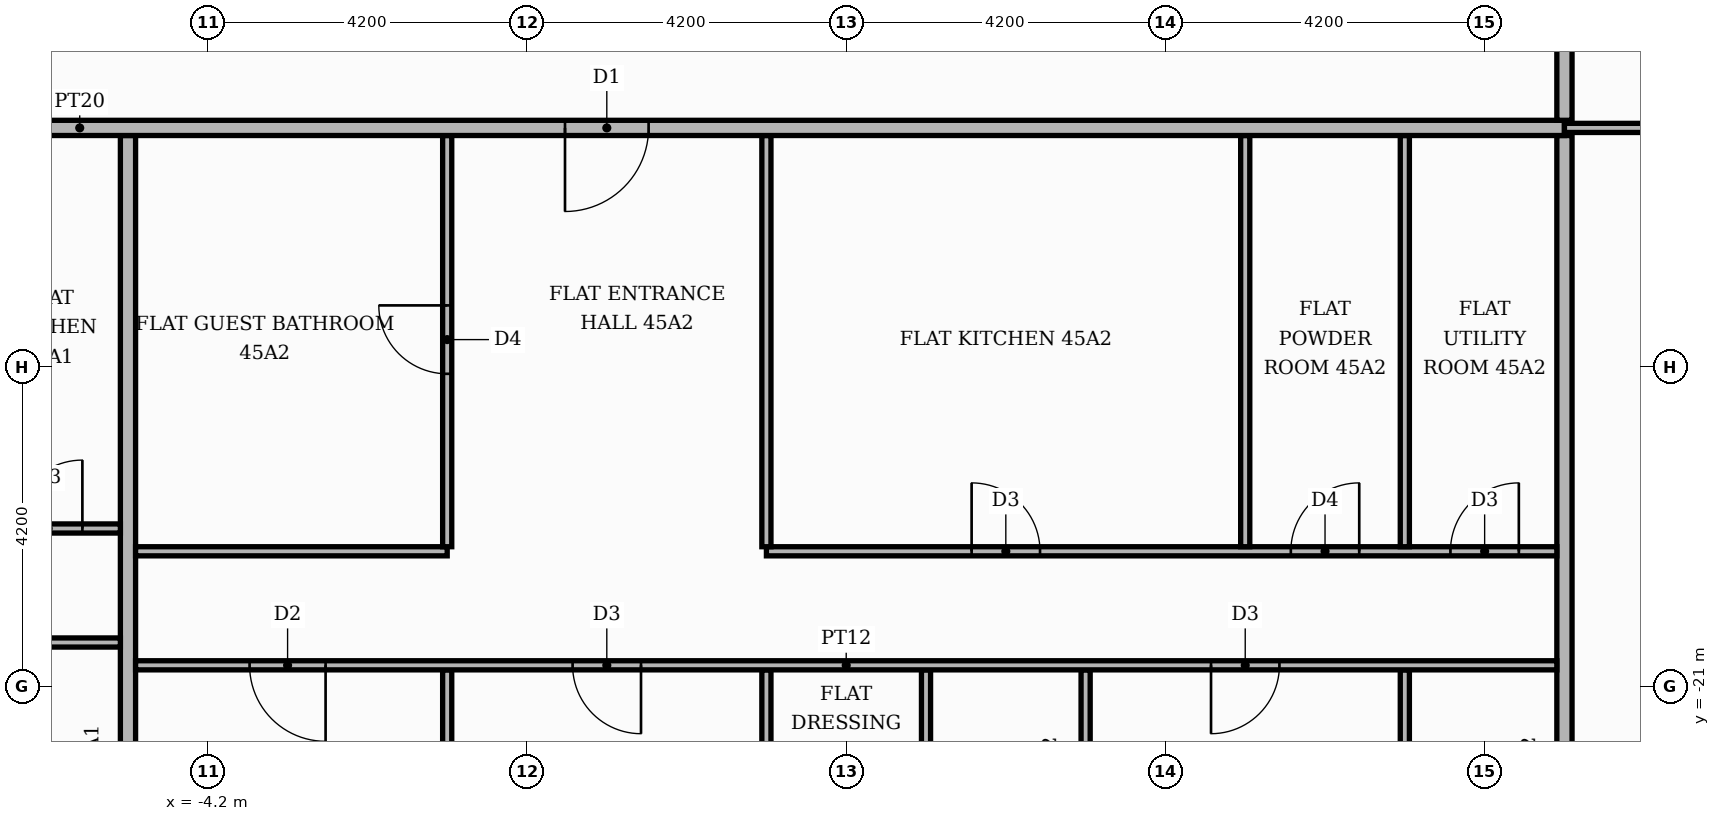
"""IFC4 building model, lengths in metres.
Left out: names, types, materials, properties, quantities, classifications, styles, units other than length and angle.
Written with IfcOpenShell. Run it as: python <this file> out.ifc"""

import sys

from ifc_helpers import new_model, si_unit, direction, frame, frame_2d, origin, place, context, subcontext, project, spatial, rectangle, extrude, element, fill, save


model = new_model("IFC4")
c1 = context("Model", 3, precision=1e-05, world=origin(), true_north=direction((0.0, 1.0)))
c2 = subcontext(c1, "Body", "Model", "MODEL_VIEW")
j1 = project(units=[si_unit("LENGTHUNIT", "METRE"), si_unit("PLANEANGLEUNIT", "RADIAN")], contexts=[c1])
p1 = place(None, origin())
s1 = spatial("IfcSite", under=j1, at=p1, CompositionType="ELEMENT")
p2 = place(p1, origin())
s2 = spatial("IfcBuilding", under=s1, at=p2, CompositionType="ELEMENT")
p3 = place(p2, frame((0.0, 0.0, 192.3)))
s3 = spatial("IfcBuildingStorey", under=s2, at=p3, CompositionType="ELEMENT", Elevation=192.3)
p4 = place(p3, frame((-5.25, -25.42, 0.0), z_axis=(0.0, 0.0, 1.0), x_axis=(0.0, 1.0, 0.0)))
e1 = element("IfcWall", 1, at=p4, inside=s3, PredefinedType="PARTITIONING", context=c2, shape_type="SweptSolid", body=[
    extrude(rectangle(XDim=11.67, YDim=0.2, at=frame_2d((5.835, 0.0))), origin(), (0.0, 0.0, 1.0), 3.48),
])
p5 = place(p3, frame((-1.05, -25.42, 0.0), z_axis=(0.0, 0.0, 1.0), x_axis=(0.0, 1.0, 0.0)))
e2 = element("IfcWall", 2, at=p5, inside=s3, PredefinedType="PARTITIONING", context=c2, shape_type="SweptSolid", body=[
    extrude(rectangle(XDim=4.64, YDim=0.12, at=frame_2d((2.32, 0.0))), origin(), (0.0, 0.0, 1.0), 3.48),
])
p6 = place(p3, frame((3.15, -25.42, 0.0), z_axis=(0.0, 0.0, 1.0), x_axis=(0.0, 1.0, 0.0)))
e3 = element("IfcWall", 3, at=p6, inside=s3, PredefinedType="PARTITIONING", context=c2, shape_type="SweptSolid", body=[
    extrude(rectangle(XDim=4.64, YDim=0.12, at=frame_2d((2.32, 0.0))), origin(), (0.0, 0.0, 1.0), 3.48),
])
p7 = place(p6, frame((1.75, 0.0, 0.0)))
e4 = element("IfcOpeningElement", 4, at=p7, cuts=e3, PredefinedType="OPENING", context=c2, shape_type="SweptSolid", body=[
    extrude(rectangle(XDim=0.9, YDim=2.1, at=frame_2d((0.45, 1.05))), frame((0.0, 0.07, 0.0), z_axis=(0.0, -1.0, 0.0), x_axis=(1.0, 0.0, 0.0)), (0.0, 0.0, 1.0), 0.14),
])
p8 = place(p3, frame((5.25, -25.42, 0.0), z_axis=(0.0, 0.0, 1.0), x_axis=(0.0, 1.0, 0.0)))
e5 = element("IfcWall", 5, at=p8, inside=s3, PredefinedType="PARTITIONING", context=c2, shape_type="SweptSolid", body=[
    extrude(rectangle(XDim=4.64, YDim=0.12, at=frame_2d((2.32, 0.0))), origin(), (0.0, 0.0, 1.0), 3.48),
])
p9 = place(p8, frame((1.75, 0.0, 0.0)))
e6 = element("IfcOpeningElement", 6, at=p9, cuts=e5, PredefinedType="OPENING", context=c2, shape_type="SweptSolid", body=[
    extrude(rectangle(XDim=0.9, YDim=2.1, at=frame_2d((0.45, 1.05))), frame((0.0, 0.07, 0.0), z_axis=(0.0, -1.0, 0.0), x_axis=(1.0, 0.0, 0.0)), (0.0, 0.0, 1.0), 0.14),
])
p10 = place(p3, frame((7.35, -25.42, 0.0), z_axis=(0.0, 0.0, 1.0), x_axis=(0.0, 1.0, 0.0)))
e7 = element("IfcWall", 7, at=p10, inside=s3, PredefinedType="PARTITIONING", context=c2, shape_type="SweptSolid", body=[
    extrude(rectangle(XDim=4.64, YDim=0.12, at=frame_2d((2.32, 0.0))), origin(), (0.0, 0.0, 1.0), 3.48),
])
p11 = place(p3, frame((11.55, -25.42, 0.0), z_axis=(0.0, 0.0, 1.0), x_axis=(0.0, 1.0, 0.0)))
e8 = element("IfcWall", 8, at=p11, inside=s3, PredefinedType="PARTITIONING", context=c2, shape_type="SweptSolid", body=[
    extrude(rectangle(XDim=4.64, YDim=0.12, at=frame_2d((2.32, 0.0))), origin(), (0.0, 0.0, 1.0), 3.48),
])
p12 = place(p11, frame((1.75, 0.0, 0.0)))
e9 = element("IfcOpeningElement", 9, at=p12, cuts=e8, PredefinedType="OPENING", context=c2, shape_type="SweptSolid", body=[
    extrude(rectangle(XDim=0.9, YDim=2.1, at=frame_2d((0.45, 1.05))), frame((0.0, 0.07, 0.0), z_axis=(0.0, -1.0, 0.0), x_axis=(1.0, 0.0, 0.0)), (0.0, 0.0, 1.0), 0.14),
])
p13 = place(p3, frame((13.65, -25.42, 0.0), z_axis=(0.0, 0.0, 1.0), x_axis=(0.0, 1.0, 0.0)))
e10 = element("IfcWall", 10, at=p13, inside=s3, PredefinedType="PARTITIONING", context=c2, shape_type="SweptSolid", body=[
    extrude(rectangle(XDim=11.67, YDim=0.2, at=frame_2d((5.835, 0.0))), origin(), (0.0, 0.0, 1.0), 3.48),
])
p14 = place(p3, frame((-5.15, -20.72, 0.0), z_axis=(0.0, 0.0, 1.0), x_axis=(1.0, 0.0, 0.0)))
e11 = element("IfcWall", 11, at=p14, inside=s3, PredefinedType="PARTITIONING", context=c2, shape_type="SweptSolid", body=[
    extrude(rectangle(XDim=18.7, YDim=0.12, at=frame_2d((9.35, 0.0))), origin(), (0.0, 0.0, 1.0), 3.48),
])
p15 = place(p14, frame((1.5, 0.0, 0.0)))
e12 = element("IfcOpeningElement", 12, at=p15, cuts=e11, PredefinedType="OPENING", context=c2, shape_type="SweptSolid", body=[
    extrude(rectangle(XDim=1.0, YDim=2.1, at=frame_2d((0.5, 1.05))), frame((0.0, 0.07, 0.0), z_axis=(0.0, -1.0, 0.0), x_axis=(1.0, 0.0, 0.0)), (0.0, 0.0, 1.0), 0.14),
])
p16 = place(p14, frame((5.75, 0.0, 0.0)))
e13 = element("IfcOpeningElement", 13, at=p16, cuts=e11, PredefinedType="OPENING", context=c2, shape_type="SweptSolid", body=[
    extrude(rectangle(XDim=0.9, YDim=2.1, at=frame_2d((0.45, 1.05))), frame((0.0, 0.07, 0.0), z_axis=(0.0, -1.0, 0.0), x_axis=(1.0, 0.0, 0.0)), (0.0, 0.0, 1.0), 0.14),
])
p17 = place(p14, frame((14.15, 0.0, 0.0)))
e14 = element("IfcOpeningElement", 14, at=p17, cuts=e11, PredefinedType="OPENING", context=c2, shape_type="SweptSolid", body=[
    extrude(rectangle(XDim=0.9, YDim=2.1, at=frame_2d((0.45, 1.05))), frame((0.0, 0.07, 0.0), z_axis=(0.0, -1.0, 0.0), x_axis=(1.0, 0.0, 0.0)), (0.0, 0.0, 1.0), 0.14),
])
p18 = place(p3, frame((-21.219, -20.42, 0.0), z_axis=(0.0, 0.0, 1.0), x_axis=(1.0, 0.0, 0.0)))
e15 = element("IfcWall", 15, at=p18, inside=s3, PredefinedType="PARTITIONING", context=c2, shape_type="SweptSolid", body=[
    extrude(rectangle(XDim=15.869, YDim=0.12, at=frame_2d((7.935, 0.0))), origin(), (0.0, 0.0, 1.0), 3.48),
])
p19 = place(p18, frame((6.019, 0.0, 0.0)))
e16 = element("IfcOpeningElement", 16, at=p19, cuts=e15, PredefinedType="OPENING", context=c2, shape_type="SweptSolid", body=[
    extrude(rectangle(XDim=1.0, YDim=2.1, at=frame_2d((0.5, 1.05))), frame((0.0, 0.07, 0.0), z_axis=(0.0, -1.0, 0.0), x_axis=(1.0, 0.0, 0.0)), (0.0, 0.0, 1.0), 0.14),
])
p20 = place(p18, frame((9.219, 0.0, 0.0)))
e17 = element("IfcOpeningElement", 17, at=p20, cuts=e15, PredefinedType="OPENING", context=c2, shape_type="SweptSolid", body=[
    extrude(rectangle(XDim=0.9, YDim=2.1, at=frame_2d((0.45, 1.05))), frame((0.0, 0.07, 0.0), z_axis=(0.0, -1.0, 0.0), x_axis=(1.0, 0.0, 0.0)), (0.0, 0.0, 1.0), 0.14),
])
p21 = place(p3, frame((-5.15, -19.22, 0.0), z_axis=(0.0, 0.0, 1.0), x_axis=(1.0, 0.0, 0.0)))
e18 = element("IfcWall", 18, at=p21, inside=s3, PredefinedType="PARTITIONING", context=c2, shape_type="SweptSolid", body=[
    extrude(rectangle(XDim=4.1, YDim=0.12, at=frame_2d((2.05, 0.0))), origin(), (0.0, 0.0, 1.0), 3.48),
])
p22 = place(p3, frame((3.15, -19.22, 0.0), z_axis=(0.0, 0.0, 1.0), x_axis=(1.0, 0.0, 0.0)))
e19 = element("IfcWall", 19, at=p22, inside=s3, PredefinedType="PARTITIONING", context=c2, shape_type="SweptSolid", body=[
    extrude(rectangle(XDim=10.4, YDim=0.12, at=frame_2d((5.2, 0.0))), origin(), (0.0, 0.0, 1.0), 3.48),
])
p23 = place(p22, frame((2.7, 0.0, 0.0)))
e20 = element("IfcOpeningElement", 20, at=p23, cuts=e19, PredefinedType="OPENING", context=c2, shape_type="SweptSolid", body=[
    extrude(rectangle(XDim=0.9, YDim=2.1, at=frame_2d((0.45, 1.05))), frame((0.0, 0.07, 0.0), z_axis=(0.0, -1.0, 0.0), x_axis=(1.0, 0.0, 0.0)), (0.0, 0.0, 1.0), 0.14),
])
p24 = place(p22, frame((6.9, 0.0, 0.0)))
e21 = element("IfcOpeningElement", 21, at=p24, cuts=e19, PredefinedType="OPENING", context=c2, shape_type="SweptSolid", body=[
    extrude(rectangle(XDim=0.9, YDim=2.1, at=frame_2d((0.45, 1.05))), frame((0.0, 0.07, 0.0), z_axis=(0.0, -1.0, 0.0), x_axis=(1.0, 0.0, 0.0)), (0.0, 0.0, 1.0), 0.14),
])
p25 = place(p22, frame((9.0, 0.0, 0.0)))
e22 = element("IfcOpeningElement", 22, at=p25, cuts=e19, PredefinedType="OPENING", context=c2, shape_type="SweptSolid", body=[
    extrude(rectangle(XDim=0.9, YDim=2.1, at=frame_2d((0.45, 1.05))), frame((0.0, 0.07, 0.0), z_axis=(0.0, -1.0, 0.0), x_axis=(1.0, 0.0, 0.0)), (0.0, 0.0, 1.0), 0.14),
])
p26 = place(p3, frame((-1.05, -19.16, 0.0), z_axis=(0.0, 0.0, 1.0), x_axis=(0.0, 1.0, 0.0)))
e23 = element("IfcWall", 23, at=p26, inside=s3, PredefinedType="PARTITIONING", context=c2, shape_type="SweptSolid", body=[
    extrude(rectangle(XDim=5.41, YDim=0.12, at=frame_2d((2.705, 0.0))), origin(), (0.0, 0.0, 1.0), 3.48),
])
p27 = place(p26, frame((2.275, 0.0, 0.0)))
e24 = element("IfcOpeningElement", 24, at=p27, cuts=e23, PredefinedType="OPENING", context=c2, shape_type="SweptSolid", body=[
    extrude(rectangle(XDim=0.9, YDim=2.1, at=frame_2d((0.45, 1.05))), frame((0.0, 0.07, 0.0), z_axis=(0.0, -1.0, 0.0), x_axis=(1.0, 0.0, 0.0)), (0.0, 0.0, 1.0), 0.14),
])
for number, where, z_axis, x_axis in (
    (25, (3.15, -19.16, 0.0), (0.0, 0.0, 1.0), (0.0, 1.0, 0.0)),
    (26, (9.45, -19.16, 0.0), (0.0, 0.0, 1.0), (0.0, 1.0, 0.0)),
    (27, (11.55, -19.16, 0.0), (0.0, 0.0, 1.0), (0.0, 1.0, 0.0)),
):
    element("IfcWall", number, at=place(p3, frame(where, z_axis=z_axis, x_axis=x_axis)), inside=s3, PredefinedType="PARTITIONING", context=c2, shape_type="SweptSolid", body=[
        extrude(rectangle(XDim=5.41, YDim=0.12, at=frame_2d((2.705, 0.0))), origin(), (0.0, 0.0, 1.0), 3.48),
    ])
p28 = place(p3, frame((-9.45, -18.92, 0.0), z_axis=(0.0, 0.0, 1.0), x_axis=(1.0, 0.0, 0.0)))
e28 = element("IfcWall", 28, at=p28, inside=s3, PredefinedType="PARTITIONING", context=c2, shape_type="SweptSolid", body=[
    extrude(rectangle(XDim=4.1, YDim=0.12, at=frame_2d((2.05, 0.0))), origin(), (0.0, 0.0, 1.0), 3.48),
])
p29 = place(p28, frame((2.7, 0.0, 0.0)))
e29 = element("IfcOpeningElement", 29, at=p29, cuts=e28, PredefinedType="OPENING", context=c2, shape_type="SweptSolid", body=[
    extrude(rectangle(XDim=0.9, YDim=2.1, at=frame_2d((0.45, 1.05))), frame((0.0, 0.07, 0.0), z_axis=(0.0, -1.0, 0.0), x_axis=(1.0, 0.0, 0.0)), (0.0, 0.0, 1.0), 0.14),
])
p30 = place(p3, frame((-25.42, -13.65, 0.0), z_axis=(0.0, 0.0, 1.0), x_axis=(1.0, 0.0, 0.0)))
e30 = element("IfcWall", 30, at=p30, inside=s3, PredefinedType="PARTITIONING", context=c2, shape_type="SweptSolid", body=[
    extrude(rectangle(XDim=39.07, YDim=0.2, at=frame_2d((19.535, 0.0))), origin(), (0.0, 0.0, 1.0), 3.48),
])
p31 = place(p30, frame((13.32, 0.0, 0.0)))
e31 = element("IfcOpeningElement", 31, at=p31, cuts=e30, PredefinedType="OPENING", context=c2, shape_type="SweptSolid", body=[
    extrude(rectangle(XDim=1.1, YDim=2.4, at=frame_2d((0.55, 1.2))), frame((0.0, 0.11, 0.0), z_axis=(0.0, -1.0, 0.0), x_axis=(1.0, 0.0, 0.0)), (0.0, 0.0, 1.0), 0.22),
])
p32 = place(p30, frame((25.92, 0.0, 0.0)))
e32 = element("IfcOpeningElement", 32, at=p32, cuts=e30, PredefinedType="OPENING", context=c2, shape_type="SweptSolid", body=[
    extrude(rectangle(XDim=1.1, YDim=2.4, at=frame_2d((0.55, 1.2))), frame((0.0, 0.11, 0.0), z_axis=(0.0, -1.0, 0.0), x_axis=(1.0, 0.0, 0.0)), (0.0, 0.0, 1.0), 0.22),
])
p33 = place(p3, frame((13.65, -13.65, 0.0), z_axis=(0.0, 0.0, 1.0), x_axis=(1.0, 0.0, 0.0)))
e33 = element("IfcWall", 33, at=p33, inside=s3, PredefinedType="PARTITIONING", context=c2, shape_type="SweptSolid", body=[
    extrude(rectangle(XDim=6.47, YDim=0.12, at=frame_2d((3.235, 0.0))), origin(), (0.0, 0.0, 1.0), 3.48),
])
p34 = place(p33, frame((2.785, 0.0, 0.0)))
e34 = element("IfcOpeningElement", 34, at=p34, cuts=e33, PredefinedType="OPENING", context=c2, shape_type="SweptSolid", body=[
    extrude(rectangle(XDim=0.9, YDim=2.1, at=frame_2d((0.45, 1.05))), frame((0.0, 0.07, 0.0), z_axis=(0.0, -1.0, 0.0), x_axis=(1.0, 0.0, 0.0)), (0.0, 0.0, 1.0), 0.14),
])
p35 = place(p3, frame((13.65, -13.55, 0.0), z_axis=(0.0, 0.0, 1.0), x_axis=(0.0, 1.0, 0.0)))
e35 = element("IfcWall", 35, at=p35, inside=s3, PredefinedType="PARTITIONING", context=c2, shape_type="SweptSolid", body=[
    extrude(rectangle(XDim=2.45, YDim=0.2, at=frame_2d((1.225, 0.0))), origin(), (0.0, 0.0, 1.0), 3.48),
])
p36 = place(p29, origin())
e36 = element("IfcDoor", 36, at=p36, inside=s3, OperationType="SINGLE_SWING_RIGHT", PredefinedType="DOOR", context=c2, shape_type="SweptSolid", body=[
    extrude(rectangle(XDim=0.9, YDim=2.1, at=frame_2d((0.45, 1.05))), frame((0.0, 0.025, 0.0), z_axis=(0.0, -1.0, 0.0), x_axis=(1.0, 0.0, 0.0)), (0.0, 0.0, 1.0), 0.05),
])
fill(e29, e36)
p37 = place(p32, frame((1.1, 0.0, 0.0), z_axis=(0.0, 0.0, 1.0), x_axis=(-1.0, 0.0, 0.0)))
e37 = element("IfcDoor", 37, at=p37, inside=s3, OperationType="SINGLE_SWING_LEFT", PredefinedType="DOOR", context=c2, shape_type="SweptSolid", body=[
    extrude(rectangle(XDim=1.1, YDim=2.4, at=frame_2d((0.55, 1.2))), frame((0.0, 0.025, 0.0), z_axis=(0.0, -1.0, 0.0), x_axis=(1.0, 0.0, 0.0)), (0.0, 0.0, 1.0), 0.05),
])
fill(e32, e37)
p38 = place(p27, origin())
e38 = element("IfcDoor", 38, at=p38, inside=s3, OperationType="SINGLE_SWING_RIGHT", PredefinedType="DOOR", context=c2, shape_type="SweptSolid", body=[
    extrude(rectangle(XDim=0.9, YDim=2.1, at=frame_2d((0.45, 1.05))), frame((0.0, 0.025, 0.0), z_axis=(0.0, -1.0, 0.0), x_axis=(1.0, 0.0, 0.0)), (0.0, 0.0, 1.0), 0.05),
])
fill(e24, e38)
p39 = place(p23, origin())
e39 = element("IfcDoor", 39, at=p39, inside=s3, OperationType="SINGLE_SWING_LEFT", PredefinedType="DOOR", context=c2, shape_type="SweptSolid", body=[
    extrude(rectangle(XDim=0.9, YDim=2.1, at=frame_2d((0.45, 1.05))), frame((0.0, 0.025, 0.0), z_axis=(0.0, -1.0, 0.0), x_axis=(1.0, 0.0, 0.0)), (0.0, 0.0, 1.0), 0.05),
])
fill(e20, e39)
p40 = place(p24, origin())
e40 = element("IfcDoor", 40, at=p40, inside=s3, OperationType="SINGLE_SWING_RIGHT", PredefinedType="DOOR", context=c2, shape_type="SweptSolid", body=[
    extrude(rectangle(XDim=0.9, YDim=2.1, at=frame_2d((0.45, 1.05))), frame((0.0, 0.025, 0.0), z_axis=(0.0, -1.0, 0.0), x_axis=(1.0, 0.0, 0.0)), (0.0, 0.0, 1.0), 0.05),
])
fill(e21, e40)
p41 = place(p25, origin())
e41 = element("IfcDoor", 41, at=p41, inside=s3, OperationType="SINGLE_SWING_RIGHT", PredefinedType="DOOR", context=c2, shape_type="SweptSolid", body=[
    extrude(rectangle(XDim=0.9, YDim=2.1, at=frame_2d((0.45, 1.05))), frame((0.0, 0.025, 0.0), z_axis=(0.0, -1.0, 0.0), x_axis=(1.0, 0.0, 0.0)), (0.0, 0.0, 1.0), 0.05),
])
fill(e22, e41)
p42 = place(p15, frame((1.0, 0.0, 0.0), z_axis=(0.0, 0.0, 1.0), x_axis=(-1.0, 0.0, 0.0)))
e42 = element("IfcDoor", 42, at=p42, inside=s3, OperationType="SINGLE_SWING_RIGHT", PredefinedType="DOOR", context=c2, shape_type="SweptSolid", body=[
    extrude(rectangle(XDim=1.0, YDim=2.1, at=frame_2d((0.5, 1.05))), frame((0.0, 0.025, 0.0), z_axis=(0.0, -1.0, 0.0), x_axis=(1.0, 0.0, 0.0)), (0.0, 0.0, 1.0), 0.05),
])
fill(e12, e42)
p43 = place(p16, frame((0.9, 0.0, 0.0), z_axis=(0.0, 0.0, 1.0), x_axis=(-1.0, 0.0, 0.0)))
e43 = element("IfcDoor", 43, at=p43, inside=s3, OperationType="SINGLE_SWING_RIGHT", PredefinedType="DOOR", context=c2, shape_type="SweptSolid", body=[
    extrude(rectangle(XDim=0.9, YDim=2.1, at=frame_2d((0.45, 1.05))), frame((0.0, 0.025, 0.0), z_axis=(0.0, -1.0, 0.0), x_axis=(1.0, 0.0, 0.0)), (0.0, 0.0, 1.0), 0.05),
])
fill(e13, e43)
p44 = place(p17, frame((0.9, 0.0, 0.0), z_axis=(0.0, 0.0, 1.0), x_axis=(-1.0, 0.0, 0.0)))
e44 = element("IfcDoor", 44, at=p44, inside=s3, OperationType="SINGLE_SWING_LEFT", PredefinedType="DOOR", context=c2, shape_type="SweptSolid", body=[
    extrude(rectangle(XDim=0.9, YDim=2.1, at=frame_2d((0.45, 1.05))), frame((0.0, 0.025, 0.0), z_axis=(0.0, -1.0, 0.0), x_axis=(1.0, 0.0, 0.0)), (0.0, 0.0, 1.0), 0.05),
])
fill(e14, e44)
save(model, sys.argv[1])
